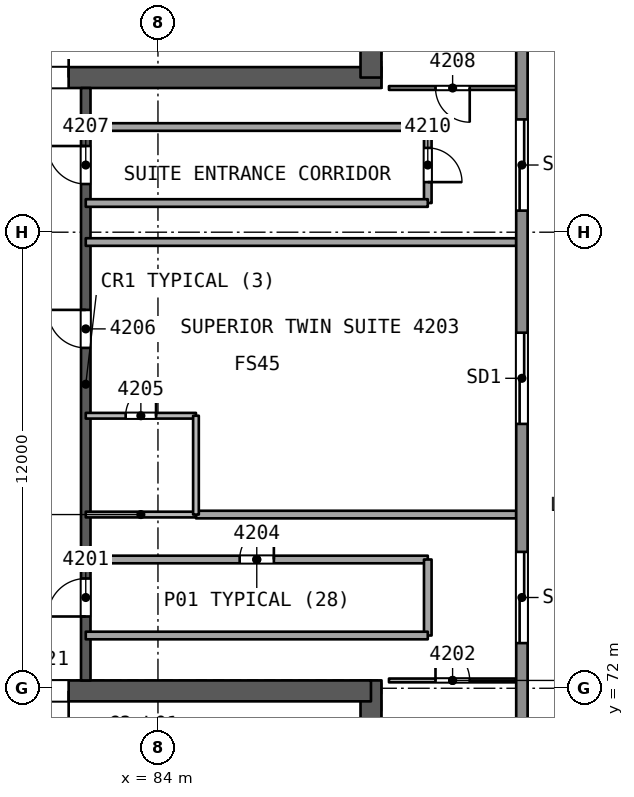
"""IFC4 building model, lengths in metres.
Left out: names, types, materials, properties, quantities, classifications, styles, units other than length and angle.
Written with IfcOpenShell. Run it as: python <this file> out.ifc"""

import sys

from ifc_helpers import new_model, si_unit, direction, frame, frame_2d, origin, place, context, subcontext, project, spatial, rectangle, extrude, element, fill, save


model = new_model("IFC4")
c1 = context("Model", 3, precision=1e-05, world=origin(), true_north=direction((0.0, 1.0)))
c2 = subcontext(c1, "Body", "Model", "MODEL_VIEW")
j1 = project(units=[si_unit("LENGTHUNIT", "METRE"), si_unit("PLANEANGLEUNIT", "RADIAN")], contexts=[c1])
p1 = place(None, origin())
s1 = spatial("IfcSite", under=j1, at=p1, CompositionType="ELEMENT")
p2 = place(p1, origin())
s2 = spatial("IfcBuilding", under=s1, at=p2, CompositionType="ELEMENT")
p3 = place(p2, frame((0.0, 0.0, 174.8)))
s3 = spatial("IfcBuildingStorey", under=s2, at=p3, CompositionType="ELEMENT", Elevation=174.8)
p4 = place(p3, frame((79.659, 88.069, 0.0), z_axis=(0.0, 0.0, 1.0), x_axis=(1.0, 0.0, 0.0)))
e1 = element("IfcWall", 1, at=p4, inside=s3, PredefinedType="SHEAR", context=c2, shape_type="SweptSolid", body=[
    extrude(rectangle(XDim=10.221, YDim=0.55, at=frame_2d((5.111, 0.0))), origin(), (0.0, 0.0, 1.0), 3.7),
])
p5 = place(p4, frame((0.791, 0.0, 0.0)))
e2 = element("IfcOpeningElement", 2, at=p5, cuts=e1, PredefinedType="OPENING", context=c2, shape_type="SweptSolid", body=[
    extrude(rectangle(XDim=1.2, YDim=2.1, at=frame_2d((0.6, 1.05))), frame((0.0, 0.286, 0.0), z_axis=(0.0, -1.0, 0.0), x_axis=(1.0, 0.0, 0.0)), (0.0, 0.0, 1.0), 0.571),
])
p6 = place(p3, frame((89.605, 88.069, 0.0), z_axis=(0.0, 0.0, 1.0), x_axis=(0.0, 1.0, 0.0)))
e3 = element("IfcWall", 3, at=p6, inside=s3, PredefinedType="SHEAR", context=c2, shape_type="SweptSolid", body=[
    extrude(rectangle(XDim=14.058, YDim=0.55, at=frame_2d((7.029, 0.0))), origin(), (0.0, 0.0, 1.0), 3.7),
])
p7 = place(p3, frame((89.605, 58.031, 0.0), z_axis=(0.0, 0.0, 1.0), x_axis=(0.0, 1.0, 0.0)))
e4 = element("IfcWall", 4, at=p7, inside=s3, PredefinedType="SHEAR", context=c2, shape_type="SweptSolid", body=[
    extrude(rectangle(XDim=14.175, YDim=0.55, at=frame_2d((7.087, 0.0))), origin(), (0.0, 0.0, 1.0), 3.7),
])
p8 = place(p3, frame((89.605, 71.931, 0.0), z_axis=(0.0, 0.0, 1.0), x_axis=(-1.0, 0.0, 0.0)))
e5 = element("IfcWall", 5, at=p8, inside=s3, PredefinedType="SHEAR", context=c2, shape_type="SweptSolid", body=[
    extrude(rectangle(XDim=10.105, YDim=0.55, at=frame_2d((5.052, 0.0))), origin(), (0.0, 0.0, 1.0), 3.7),
])
p9 = place(p8, frame((7.955, 0.0, 0.0)))
e6 = element("IfcOpeningElement", 6, at=p9, cuts=e5, PredefinedType="OPENING", context=c2, shape_type="SweptSolid", body=[
    extrude(rectangle(XDim=1.2, YDim=2.1, at=frame_2d((0.6, 1.05))), frame((0.0, 0.286, 0.0), z_axis=(0.0, -1.0, 0.0), x_axis=(1.0, 0.0, 0.0)), (0.0, 0.0, 1.0), 0.571),
])
p10 = place(p3, frame((82.1, 72.206, 0.0), z_axis=(0.0, 0.0, 1.0), x_axis=(0.0, 1.0, 0.0)))
e7 = element("IfcWall", 7, at=p10, inside=s3, PredefinedType="SHEAR", context=c2, shape_type="SweptSolid", body=[
    extrude(rectangle(XDim=15.588, YDim=0.25, at=frame_2d((7.794, 0.0))), origin(), (0.0, 0.0, 1.0), 3.25),
])
p11 = place(p10, frame((1.682, 0.0, 0.0)))
e8 = element("IfcOpeningElement", 8, at=p11, cuts=e7, PredefinedType="OPENING", context=c2, shape_type="SweptSolid", body=[
    extrude(rectangle(XDim=1.0, YDim=2.1, at=frame_2d((0.5, 1.05))), frame((0.0, 0.135, 0.0), z_axis=(0.0, -1.0, 0.0), x_axis=(1.0, 0.0, 0.0)), (0.0, 0.0, 1.0), 0.271),
])
p12 = place(p10, frame((8.75, 0.0, 0.0)))
e9 = element("IfcOpeningElement", 9, at=p12, cuts=e7, PredefinedType="OPENING", context=c2, shape_type="SweptSolid", body=[
    extrude(rectangle(XDim=1.0, YDim=2.1, at=frame_2d((0.5, 1.05))), frame((0.0, 0.135, 0.0), z_axis=(0.0, -1.0, 0.0), x_axis=(1.0, 0.0, 0.0)), (0.0, 0.0, 1.0), 0.271),
])
p13 = place(p10, frame((13.062, 0.0, 0.0)))
e10 = element("IfcOpeningElement", 10, at=p13, cuts=e7, PredefinedType="OPENING", context=c2, shape_type="SweptSolid", body=[
    extrude(rectangle(XDim=1.0, YDim=2.1, at=frame_2d((0.5, 1.05))), frame((0.0, 0.135, 0.0), z_axis=(0.0, -1.0, 0.0), x_axis=(1.0, 0.0, 0.0)), (0.0, 0.0, 1.0), 0.271),
])
p14 = place(p3, frame((90.079, 72.206, 0.0), z_axis=(0.0, 0.0, 1.0), x_axis=(1.0, 0.0, 0.0)))
e11 = element("IfcWall", 11, at=p14, inside=s3, PredefinedType="PARTITIONING", context=c2, shape_type="SweptSolid", body=[
    extrude(rectangle(XDim=3.349, YDim=0.1, at=frame_2d((1.674, 0.0))), origin(), (0.0, 0.0, 1.0), 3.25),
])
p15 = place(p14, frame((1.224, 0.0, 0.0)))
e12 = element("IfcOpeningElement", 12, at=p15, cuts=e11, PredefinedType="OPENING", context=c2, shape_type="SweptSolid", body=[
    extrude(rectangle(XDim=0.9, YDim=2.1, at=frame_2d((0.45, 1.05))), frame((0.0, 0.061, 0.0), z_axis=(0.0, -1.0, 0.0), x_axis=(1.0, 0.0, 0.0)), (0.0, 0.0, 1.0), 0.121),
])
p16 = place(p3, frame((82.1, 75.388, 0.0), z_axis=(0.0, 0.0, 1.0), x_axis=(1.0, 0.0, 0.0)))
e13 = element("IfcWall", 13, at=p16, inside=s3, PredefinedType="PARTITIONING", context=c2, shape_type="SweptSolid", body=[
    extrude(rectangle(XDim=9.0, YDim=0.2, at=frame_2d((4.5, 0.0))), origin(), (0.0, 0.0, 1.0), 3.25),
])
p17 = place(p16, frame((4.05, 0.0, 0.0)))
e14 = element("IfcOpeningElement", 14, at=p17, cuts=e13, PredefinedType="OPENING", context=c2, shape_type="SweptSolid", body=[
    extrude(rectangle(XDim=0.9, YDim=2.1, at=frame_2d((0.45, 1.05))), frame((0.0, 0.11, 0.0), z_axis=(0.0, -1.0, 0.0), x_axis=(1.0, 0.0, 0.0)), (0.0, 0.0, 1.0), 0.221),
])
p18 = place(p3, frame((91.1, 75.388, 0.0), z_axis=(0.0, 0.0, 1.0), x_axis=(0.0, -1.0, 0.0)))
e15 = element("IfcWall", 15, at=p18, inside=s3, PredefinedType="PARTITIONING", context=c2, shape_type="SweptSolid", body=[
    extrude(rectangle(XDim=2.0, YDim=0.2, at=frame_2d((1.0, 0.0))), origin(), (0.0, 0.0, 1.0), 3.25),
])
p19 = place(p3, frame((91.1, 73.388, 0.0), z_axis=(0.0, 0.0, 1.0), x_axis=(-1.0, 0.0, 0.0)))
e16 = element("IfcWall", 16, at=p19, inside=s3, PredefinedType="PARTITIONING", context=c2, shape_type="SweptSolid", body=[
    extrude(rectangle(XDim=9.0, YDim=0.2, at=frame_2d((4.5, 0.0))), origin(), (0.0, 0.0, 1.0), 3.25),
])
p20 = place(p3, frame((93.428, 76.571, 0.0), z_axis=(0.0, 0.0, 1.0), x_axis=(-1.0, 0.0, 0.0)))
e17 = element("IfcWall", 17, at=p20, inside=s3, PredefinedType="PARTITIONING", context=c2, shape_type="SweptSolid", body=[
    extrude(rectangle(XDim=8.428, YDim=0.2, at=frame_2d((4.214, 0.0))), origin(), (0.0, 0.0, 1.0), 3.25),
])
p21 = place(p3, frame((85.0, 76.571, 0.0), z_axis=(0.0, 0.0, 1.0), x_axis=(-1.0, 0.0, 0.0)))
e18 = element("IfcWall", 18, at=p21, inside=s3, PredefinedType="PARTITIONING", context=c2, shape_type="SweptSolid", body=[
    extrude(rectangle(XDim=2.9, YDim=0.15, at=frame_2d((1.45, 0.0))), origin(), (0.0, 0.0, 1.0), 3.25),
])
p22 = place(p3, frame((82.1, 79.171, 0.0), z_axis=(0.0, 0.0, 1.0), x_axis=(1.0, 0.0, 0.0)))
e19 = element("IfcWall", 19, at=p22, inside=s3, PredefinedType="PARTITIONING", context=c2, shape_type="SweptSolid", body=[
    extrude(rectangle(XDim=2.9, YDim=0.15, at=frame_2d((1.45, 0.0))), origin(), (0.0, 0.0, 1.0), 3.25),
])
p23 = place(p22, frame((1.05, 0.0, 0.0)))
e20 = element("IfcOpeningElement", 20, at=p23, cuts=e19, PredefinedType="OPENING", context=c2, shape_type="SweptSolid", body=[
    extrude(rectangle(XDim=0.8, YDim=2.1, at=frame_2d((0.4, 1.05))), frame((0.0, 0.085, 0.0), z_axis=(0.0, -1.0, 0.0), x_axis=(1.0, 0.0, 0.0)), (0.0, 0.0, 1.0), 0.171),
])
p24 = place(p3, frame((85.0, 79.171, 0.0), z_axis=(0.0, 0.0, 1.0), x_axis=(0.0, -1.0, 0.0)))
e21 = element("IfcWall", 21, at=p24, inside=s3, PredefinedType="PARTITIONING", context=c2, shape_type="SweptSolid", body=[
    extrude(rectangle(XDim=2.6, YDim=0.15, at=frame_2d((1.3, 0.0))), origin(), (0.0, 0.0, 1.0), 3.25),
])
p25 = place(p3, frame((93.428, 83.741, 0.0), z_axis=(0.0, 0.0, 1.0), x_axis=(-1.0, 0.0, 0.0)))
e22 = element("IfcWall", 22, at=p25, inside=s3, PredefinedType="PARTITIONING", context=c2, shape_type="SweptSolid", body=[
    extrude(rectangle(XDim=11.328, YDim=0.2, at=frame_2d((5.664, 0.0))), origin(), (0.0, 0.0, 1.0), 3.25),
])
p26 = place(p3, frame((93.428, 87.794, 0.0), z_axis=(0.0, 0.0, 1.0), x_axis=(-1.0, 0.0, 0.0)))
e23 = element("IfcWall", 23, at=p26, inside=s3, PredefinedType="PARTITIONING", context=c2, shape_type="SweptSolid", body=[
    extrude(rectangle(XDim=3.349, YDim=0.1, at=frame_2d((1.674, 0.0))), origin(), (0.0, 0.0, 1.0), 3.25),
])
p27 = place(p26, frame((1.224, 0.0, 0.0)))
e24 = element("IfcOpeningElement", 24, at=p27, cuts=e23, PredefinedType="OPENING", context=c2, shape_type="SweptSolid", body=[
    extrude(rectangle(XDim=0.9, YDim=2.1, at=frame_2d((0.45, 1.05))), frame((0.0, 0.061, 0.0), z_axis=(0.0, -1.0, 0.0), x_axis=(1.0, 0.0, 0.0)), (0.0, 0.0, 1.0), 0.121),
])
p28 = place(p3, frame((82.1, 86.768, 0.0), z_axis=(0.0, 0.0, 1.0), x_axis=(1.0, 0.0, 0.0)))
e25 = element("IfcWall", 25, at=p28, inside=s3, PredefinedType="PARTITIONING", context=c2, shape_type="SweptSolid", body=[
    extrude(rectangle(XDim=9.0, YDim=0.2, at=frame_2d((4.5, 0.0))), origin(), (0.0, 0.0, 1.0), 3.25),
])
p29 = place(p3, frame((91.1, 86.768, 0.0), z_axis=(0.0, 0.0, 1.0), x_axis=(0.0, -1.0, 0.0)))
e26 = element("IfcWall", 26, at=p29, inside=s3, PredefinedType="PARTITIONING", context=c2, shape_type="SweptSolid", body=[
    extrude(rectangle(XDim=2.0, YDim=0.2, at=frame_2d((1.0, 0.0))), origin(), (0.0, 0.0, 1.0), 3.25),
])
p30 = place(p29, frame((0.55, 0.0, 0.0)))
e27 = element("IfcOpeningElement", 27, at=p30, cuts=e26, PredefinedType="OPENING", context=c2, shape_type="SweptSolid", body=[
    extrude(rectangle(XDim=0.9, YDim=2.1, at=frame_2d((0.45, 1.05))), frame((0.0, 0.11, 0.0), z_axis=(0.0, -1.0, 0.0), x_axis=(1.0, 0.0, 0.0)), (0.0, 0.0, 1.0), 0.221),
])
p31 = place(p3, frame((91.1, 84.768, 0.0), z_axis=(0.0, 0.0, 1.0), x_axis=(-1.0, 0.0, 0.0)))
e28 = element("IfcWall", 28, at=p31, inside=s3, PredefinedType="PARTITIONING", context=c2, shape_type="SweptSolid", body=[
    extrude(rectangle(XDim=9.0, YDim=0.2, at=frame_2d((4.5, 0.0))), origin(), (0.0, 0.0, 1.0), 3.25),
])
p32 = place(p3, frame((93.577, 106.71, 0.0), z_axis=(0.0, 0.0, 1.0), x_axis=(0.0, -1.0, 0.0)))
e29 = element("IfcWall", 29, at=p32, inside=s3, PredefinedType="SOLIDWALL", context=c2, shape_type="SweptSolid", body=[
    extrude(rectangle(XDim=53.42, YDim=0.3, at=frame_2d((26.71, 0.0))), origin(), (0.0, 0.0, 1.0), 3.25),
])
p33 = place(p32, frame((31.122, 0.0, 0.0)))
e30 = element("IfcOpeningElement", 30, at=p33, cuts=e29, PredefinedType="OPENING", context=c2, shape_type="SweptSolid", body=[
    extrude(rectangle(XDim=2.4, YDim=2.4, at=frame_2d((1.2, 1.2))), frame((0.0, 0.161, 0.0), z_axis=(0.0, -1.0, 0.0), x_axis=(1.0, 0.0, 0.0)), (0.0, 0.0, 1.0), 0.321),
])
p34 = place(p32, frame((41.52, 0.0, 0.0)))
e31 = element("IfcOpeningElement", 31, at=p34, cuts=e29, PredefinedType="OPENING", context=c2, shape_type="SweptSolid", body=[
    extrude(rectangle(XDim=2.4, YDim=2.4, at=frame_2d((1.2, 1.2))), frame((0.0, 0.161, 0.0), z_axis=(0.0, -1.0, 0.0), x_axis=(1.0, 0.0, 0.0)), (0.0, 0.0, 1.0), 0.321),
])
p35 = place(p32, frame((19.742, 0.0, 0.0)))
e32 = element("IfcOpeningElement", 32, at=p35, cuts=e29, PredefinedType="OPENING", context=c2, shape_type="SweptSolid", body=[
    extrude(rectangle(XDim=2.4, YDim=2.4, at=frame_2d((1.2, 1.2))), frame((0.0, 0.161, 0.0), z_axis=(0.0, -1.0, 0.0), x_axis=(1.0, 0.0, 0.0)), (0.0, 0.0, 1.0), 0.321),
])
p36 = place(p32, frame((9.507, 0.0, 0.0)))
e33 = element("IfcOpeningElement", 33, at=p36, cuts=e29, PredefinedType="OPENING", context=c2, shape_type="SweptSolid", body=[
    extrude(rectangle(XDim=2.4, YDim=2.4, at=frame_2d((1.2, 1.2))), frame((0.0, 0.161, 0.0), z_axis=(0.0, -1.0, 0.0), x_axis=(1.0, 0.0, 0.0)), (0.0, 0.0, 1.0), 0.321),
])
p37 = place(p32, frame((25.354, 0.0, 0.0)))
e34 = element("IfcOpeningElement", 34, at=p37, cuts=e29, PredefinedType="OPENING", context=c2, shape_type="SweptSolid", body=[
    extrude(rectangle(XDim=2.4, YDim=2.4, at=frame_2d((1.2, 1.2))), frame((0.0, 0.161, 0.0), z_axis=(0.0, -1.0, 0.0), x_axis=(1.0, 0.0, 0.0)), (0.0, 0.0, 1.0), 0.321),
])
p38 = place(p3, frame((42.58, 82.733, 0.0), z_axis=(0.0, 0.0, 1.0), x_axis=(0.866025382531, 0.500000036812, 0.0)))
e35 = element("IfcWall", 35, at=p38, inside=s3, PredefinedType="SOLIDWALL", context=c2, shape_type="SweptSolid", body=[
    extrude(rectangle(XDim=53.42, YDim=0.3, at=frame_2d((26.71, 0.0))), origin(), (0.0, 0.0, 1.0), 3.25),
])
p39 = place(p38, frame((30.499, 0.0, 0.0)))
e36 = element("IfcOpeningElement", 36, at=p39, cuts=e35, PredefinedType="OPENING", context=c2, shape_type="SweptSolid", body=[
    extrude(rectangle(XDim=2.4, YDim=2.4, at=frame_2d((1.2, 1.2))), frame((0.0, 0.161, 0.0), z_axis=(0.0, -1.0, 0.0), x_axis=(1.0, 0.0, 0.0)), (0.0, 0.0, 1.0), 0.321),
])
p40 = place(p38, frame((41.52, 0.0, 0.0)))
e37 = element("IfcOpeningElement", 37, at=p40, cuts=e35, PredefinedType="OPENING", context=c2, shape_type="SweptSolid", body=[
    extrude(rectangle(XDim=2.4, YDim=2.4, at=frame_2d((1.2, 1.2))), frame((0.0, 0.161, 0.0), z_axis=(0.0, -1.0, 0.0), x_axis=(1.0, 0.0, 0.0)), (0.0, 0.0, 1.0), 0.321),
])
p41 = place(p38, frame((19.742, 0.0, 0.0)))
e38 = element("IfcOpeningElement", 38, at=p41, cuts=e35, PredefinedType="OPENING", context=c2, shape_type="SweptSolid", body=[
    extrude(rectangle(XDim=2.4, YDim=2.4, at=frame_2d((1.2, 1.2))), frame((0.0, 0.161, 0.0), z_axis=(0.0, -1.0, 0.0), x_axis=(1.0, 0.0, 0.0)), (0.0, 0.0, 1.0), 0.321),
])
p42 = place(p38, frame((9.507, 0.0, 0.0)))
e39 = element("IfcOpeningElement", 39, at=p42, cuts=e35, PredefinedType="OPENING", context=c2, shape_type="SweptSolid", body=[
    extrude(rectangle(XDim=2.4, YDim=2.4, at=frame_2d((1.2, 1.2))), frame((0.0, 0.161, 0.0), z_axis=(0.0, -1.0, 0.0), x_axis=(1.0, 0.0, 0.0)), (0.0, 0.0, 1.0), 0.321),
])
p43 = place(p38, frame((26.512, 0.0, 0.9)))
e40 = element("IfcOpeningElement", 40, at=p43, cuts=e35, PredefinedType="OPENING", context=c2, shape_type="SweptSolid", body=[
    extrude(rectangle(XDim=1.8, YDim=1.5, at=frame_2d((0.9, 0.75))), frame((0.0, 0.161, 0.0), z_axis=(0.0, -1.0, 0.0), x_axis=(1.0, 0.0, 0.0)), (0.0, 0.0, 1.0), 0.321),
])
p44 = place(p38, frame((23.55, 0.0, 0.9)))
e41 = element("IfcOpeningElement", 41, at=p44, cuts=e35, PredefinedType="OPENING", context=c2, shape_type="SweptSolid", body=[
    extrude(rectangle(XDim=1.8, YDim=1.5, at=frame_2d((0.9, 0.75))), frame((0.0, 0.161, 0.0), z_axis=(0.0, -1.0, 0.0), x_axis=(1.0, 0.0, 0.0)), (0.0, 0.0, 1.0), 0.321),
])
p45 = place(p3, frame((88.844, 50.557, 0.0), z_axis=(0.0, 0.0, 1.0), x_axis=(-0.866025382531, 0.500000036812, 0.0)))
e42 = element("IfcWall", 42, at=p45, inside=s3, PredefinedType="SOLIDWALL", context=c2, shape_type="SweptSolid", body=[
    extrude(rectangle(XDim=53.42, YDim=0.3, at=frame_2d((26.71, 0.0))), origin(), (0.0, 0.0, 1.0), 3.25),
])
p46 = place(p45, frame((31.122, 0.0, 0.0)))
e43 = element("IfcOpeningElement", 43, at=p46, cuts=e42, PredefinedType="OPENING", context=c2, shape_type="SweptSolid", body=[
    extrude(rectangle(XDim=2.4, YDim=2.4, at=frame_2d((1.2, 1.2))), frame((0.0, 0.161, 0.0), z_axis=(0.0, -1.0, 0.0), x_axis=(1.0, 0.0, 0.0)), (0.0, 0.0, 1.0), 0.321),
])
p47 = place(p45, frame((41.52, 0.0, 0.0)))
e44 = element("IfcOpeningElement", 44, at=p47, cuts=e42, PredefinedType="OPENING", context=c2, shape_type="SweptSolid", body=[
    extrude(rectangle(XDim=2.4, YDim=2.4, at=frame_2d((1.2, 1.2))), frame((0.0, 0.161, 0.0), z_axis=(0.0, -1.0, 0.0), x_axis=(1.0, 0.0, 0.0)), (0.0, 0.0, 1.0), 0.321),
])
p48 = place(p45, frame((20.834, 0.0, 0.0)))
e45 = element("IfcOpeningElement", 45, at=p48, cuts=e42, PredefinedType="OPENING", context=c2, shape_type="SweptSolid", body=[
    extrude(rectangle(XDim=2.4, YDim=2.4, at=frame_2d((1.2, 1.2))), frame((0.0, 0.161, 0.0), z_axis=(0.0, -1.0, 0.0), x_axis=(1.0, 0.0, 0.0)), (0.0, 0.0, 1.0), 0.321),
])
p49 = place(p45, frame((9.507, 0.0, 0.0)))
e46 = element("IfcOpeningElement", 46, at=p49, cuts=e42, PredefinedType="OPENING", context=c2, shape_type="SweptSolid", body=[
    extrude(rectangle(XDim=2.4, YDim=2.4, at=frame_2d((1.2, 1.2))), frame((0.0, 0.161, 0.0), z_axis=(0.0, -1.0, 0.0), x_axis=(1.0, 0.0, 0.0)), (0.0, 0.0, 1.0), 0.321),
])
p50 = place(p45, frame((26.446, 0.0, 0.0)))
e47 = element("IfcOpeningElement", 47, at=p50, cuts=e42, PredefinedType="OPENING", context=c2, shape_type="SweptSolid", body=[
    extrude(rectangle(XDim=2.4, YDim=2.4, at=frame_2d((1.2, 1.2))), frame((0.0, 0.161, 0.0), z_axis=(0.0, -1.0, 0.0), x_axis=(1.0, 0.0, 0.0)), (0.0, 0.0, 1.0), 0.321),
])
p51 = place(p11, origin())
e48 = element("IfcDoor", 48, at=p51, inside=s3, OperationType="SINGLE_SWING_LEFT", PredefinedType="NOTDEFINED", context=c2, shape_type="SweptSolid", body=[
    extrude(rectangle(XDim=1.0, YDim=2.1, at=frame_2d((0.5, 1.05))), frame((0.0, 0.025, 0.0), z_axis=(0.0, -1.0, 0.0), x_axis=(1.0, 0.0, 0.0)), (0.0, 0.0, 1.0), 0.05),
])
fill(e8, e48)
p52 = place(p15, origin())
e49 = element("IfcDoor", 49, at=p52, inside=s3, OperationType="SINGLE_SWING_LEFT", PredefinedType="NOTDEFINED", context=c2, shape_type="SweptSolid", body=[
    extrude(rectangle(XDim=0.9, YDim=2.1, at=frame_2d((0.45, 1.05))), frame((0.0, 0.025, 0.0), z_axis=(0.0, -1.0, 0.0), x_axis=(1.0, 0.0, 0.0)), (0.0, 0.0, 1.0), 0.05),
])
fill(e12, e49)
p53 = place(p17, origin())
e50 = element("IfcDoor", 50, at=p53, inside=s3, OperationType="SINGLE_SWING_RIGHT", PredefinedType="NOTDEFINED", context=c2, shape_type="SweptSolid", body=[
    extrude(rectangle(XDim=0.9, YDim=2.1, at=frame_2d((0.45, 1.05))), frame((0.0, 0.025, 0.0), z_axis=(0.0, -1.0, 0.0), x_axis=(1.0, 0.0, 0.0)), (0.0, 0.0, 1.0), 0.05),
])
fill(e14, e50)
p54 = place(p23, origin())
e51 = element("IfcDoor", 51, at=p54, inside=s3, OperationType="SINGLE_SWING_RIGHT", PredefinedType="NOTDEFINED", context=c2, shape_type="SweptSolid", body=[
    extrude(rectangle(XDim=0.8, YDim=2.1, at=frame_2d((0.4, 1.05))), frame((0.0, 0.025, 0.0), z_axis=(0.0, -1.0, 0.0), x_axis=(1.0, 0.0, 0.0)), (0.0, 0.0, 1.0), 0.05),
])
fill(e20, e51)
p55 = place(p12, origin())
e52 = element("IfcDoor", 52, at=p55, inside=s3, OperationType="SINGLE_SWING_RIGHT", PredefinedType="NOTDEFINED", context=c2, shape_type="SweptSolid", body=[
    extrude(rectangle(XDim=1.0, YDim=2.1, at=frame_2d((0.5, 1.05))), frame((0.0, 0.025, 0.0), z_axis=(0.0, -1.0, 0.0), x_axis=(1.0, 0.0, 0.0)), (0.0, 0.0, 1.0), 0.05),
])
fill(e9, e52)
p56 = place(p13, origin())
e53 = element("IfcDoor", 53, at=p56, inside=s3, OperationType="SINGLE_SWING_RIGHT", PredefinedType="NOTDEFINED", context=c2, shape_type="SweptSolid", body=[
    extrude(rectangle(XDim=1.0, YDim=2.1, at=frame_2d((0.5, 1.05))), frame((0.0, 0.025, 0.0), z_axis=(0.0, -1.0, 0.0), x_axis=(1.0, 0.0, 0.0)), (0.0, 0.0, 1.0), 0.05),
])
fill(e10, e53)
p57 = place(p27, origin())
e54 = element("IfcDoor", 54, at=p57, inside=s3, OperationType="SINGLE_SWING_LEFT", PredefinedType="NOTDEFINED", context=c2, shape_type="SweptSolid", body=[
    extrude(rectangle(XDim=0.9, YDim=2.1, at=frame_2d((0.45, 1.05))), frame((0.0, 0.025, 0.0), z_axis=(0.0, -1.0, 0.0), x_axis=(1.0, 0.0, 0.0)), (0.0, 0.0, 1.0), 0.05),
])
fill(e24, e54)
p58 = place(p30, origin())
e55 = element("IfcDoor", 55, at=p58, inside=s3, OperationType="SINGLE_SWING_RIGHT", PredefinedType="NOTDEFINED", context=c2, shape_type="SweptSolid", body=[
    extrude(rectangle(XDim=0.9, YDim=2.1, at=frame_2d((0.45, 1.05))), frame((0.0, 0.025, 0.0), z_axis=(0.0, -1.0, 0.0), x_axis=(1.0, 0.0, 0.0)), (0.0, 0.0, 1.0), 0.05),
])
fill(e27, e55)
p59 = place(p33, origin())
e56 = element("IfcDoor", 56, at=p59, inside=s3, OperationType="SLIDING_TO_LEFT", PredefinedType="NOTDEFINED", context=c2, shape_type="SweptSolid", body=[
    extrude(rectangle(XDim=2.4, YDim=2.4, at=frame_2d((1.2, 1.2))), frame((0.0, 0.025, 0.0), z_axis=(0.0, -1.0, 0.0), x_axis=(1.0, 0.0, 0.0)), (0.0, 0.0, 1.0), 0.05),
])
fill(e30, e56)
p60 = place(p35, origin())
e57 = element("IfcDoor", 57, at=p60, inside=s3, OperationType="SLIDING_TO_LEFT", PredefinedType="NOTDEFINED", context=c2, shape_type="SweptSolid", body=[
    extrude(rectangle(XDim=2.4, YDim=2.4, at=frame_2d((1.2, 1.2))), frame((0.0, 0.025, 0.0), z_axis=(0.0, -1.0, 0.0), x_axis=(1.0, 0.0, 0.0)), (0.0, 0.0, 1.0), 0.05),
])
fill(e32, e57)
p61 = place(p37, origin())
e58 = element("IfcDoor", 58, at=p61, inside=s3, OperationType="SLIDING_TO_LEFT", PredefinedType="NOTDEFINED", context=c2, shape_type="SweptSolid", body=[
    extrude(rectangle(XDim=2.4, YDim=2.4, at=frame_2d((1.2, 1.2))), frame((0.0, 0.025, 0.0), z_axis=(0.0, -1.0, 0.0), x_axis=(1.0, 0.0, 0.0)), (0.0, 0.0, 1.0), 0.05),
])
fill(e34, e58)
p62 = place(p5, origin())
e59 = element("IfcDoor", 59, at=p62, inside=s3, OperationType="SINGLE_SWING_RIGHT", PredefinedType="NOTDEFINED", context=c2, shape_type="SweptSolid", body=[
    extrude(rectangle(XDim=1.2, YDim=2.1, at=frame_2d((0.6, 1.05))), frame((0.0, 0.025, 0.0), z_axis=(0.0, -1.0, 0.0), x_axis=(1.0, 0.0, 0.0)), (0.0, 0.0, 1.0), 0.05),
])
fill(e2, e59)
p63 = place(p9, origin())
e60 = element("IfcDoor", 60, at=p63, inside=s3, OperationType="SINGLE_SWING_LEFT", PredefinedType="NOTDEFINED", context=c2, shape_type="SweptSolid", body=[
    extrude(rectangle(XDim=1.2, YDim=2.1, at=frame_2d((0.6, 1.05))), frame((0.0, 0.025, 0.0), z_axis=(0.0, -1.0, 0.0), x_axis=(1.0, 0.0, 0.0)), (0.0, 0.0, 1.0), 0.05),
])
fill(e6, e60)
save(model, sys.argv[1])
